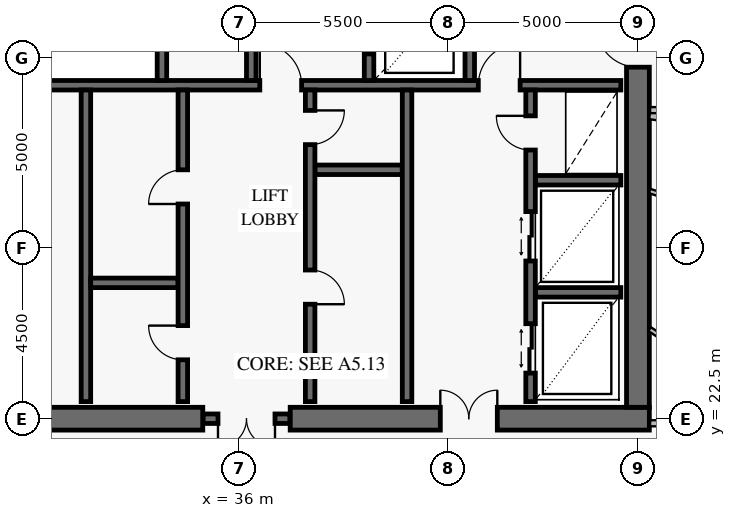
"""IFC4 building model, lengths in metres.
Left out: names, types, materials, properties, quantities, classifications, styles, units other than length and angle.
Written with IfcOpenShell. Run it as: python <this file> out.ifc"""

import sys

from ifc_helpers import new_model, si_unit, direction, frame, frame_2d, origin, place, context, subcontext, project, spatial, rectangle, extrude, element, fill, save


model = new_model("IFC4")
c1 = context("Model", 3, precision=1e-05, world=origin(), true_north=direction((0.0, 1.0)))
c2 = subcontext(c1, "Body", "Model", "MODEL_VIEW")
j1 = project(units=[si_unit("LENGTHUNIT", "METRE"), si_unit("PLANEANGLEUNIT", "RADIAN")], contexts=[c1])
p1 = place(None, origin())
s1 = spatial("IfcSite", under=j1, at=p1, CompositionType="ELEMENT")
p2 = place(p1, origin())
s2 = spatial("IfcBuilding", under=s1, at=p2, CompositionType="ELEMENT")
p3 = place(p2, frame((0.0, 0.0, 231.2)))
s3 = spatial("IfcBuildingStorey", under=s2, at=p3, CompositionType="ELEMENT", Elevation=231.2)
p4 = place(p3, frame((25.2, 22.5, 0.0), z_axis=(0.0, 0.0, 1.0), x_axis=(1.0, 0.0, 0.0)))
e1 = element("IfcWall", 1, at=p4, inside=s3, PredefinedType="SHEAR", context=c2, shape_type="SweptSolid", body=[
    extrude(rectangle(XDim=9.85, YDim=0.6, at=frame_2d((4.925, 0.0))), origin(), (0.0, 0.0, 1.0), 3.8),
])
p5 = place(p4, frame((4.2, 0.0, 0.0)))
e2 = element("IfcOpeningElement", 2, at=p5, cuts=e1, PredefinedType="OPENING", context=c2, shape_type="SweptSolid", body=[
    extrude(rectangle(XDim=1.5, YDim=2.15, at=frame_2d((0.75, 1.075))), frame((0.0, 0.312, 0.0), z_axis=(0.0, -1.0, 0.0), x_axis=(1.0, 0.0, 0.0)), (0.0, 0.0, 1.0), 0.624),
])
p6 = place(p3, frame((37.35, 22.5, 0.0), z_axis=(0.0, 0.0, 1.0), x_axis=(1.0, 0.0, 0.0)))
e3 = element("IfcWall", 3, at=p6, inside=s3, PredefinedType="SHEAR", context=c2, shape_type="SweptSolid", body=[
    extrude(rectangle(XDim=9.45, YDim=0.6, at=frame_2d((4.725, 0.0))), origin(), (0.0, 0.0, 1.0), 3.8),
])
p7 = place(p6, frame((3.95, 0.0, 0.0)))
e4 = element("IfcOpeningElement", 4, at=p7, cuts=e3, PredefinedType="OPENING", context=c2, shape_type="SweptSolid", body=[
    extrude(rectangle(XDim=1.5, YDim=2.15, at=frame_2d((0.75, 1.075))), frame((0.0, 0.312, 0.0), z_axis=(0.0, -1.0, 0.0), x_axis=(1.0, 0.0, 0.0)), (0.0, 0.0, 1.0), 0.624),
])
p8 = place(p3, frame((46.5, 22.8, 0.0), z_axis=(0.0, 0.0, 1.0), x_axis=(0.0, 1.0, 0.0)))
e5 = element("IfcWall", 5, at=p8, inside=s3, PredefinedType="SHEAR", context=c2, shape_type="SweptSolid", body=[
    extrude(rectangle(XDim=18.4, YDim=0.6, at=frame_2d((9.2, 0.0))), origin(), (0.0, 0.0, 1.0), 3.8),
])
p9 = place(p8, frame((8.95, 0.0, 0.0)))
e6 = element("IfcOpeningElement", 6, at=p9, cuts=e5, PredefinedType="OPENING", context=c2, shape_type="SweptSolid", body=[
    extrude(rectangle(XDim=1.1, YDim=2.15, at=frame_2d((0.55, 1.075))), frame((0.0, 0.312, 0.0), z_axis=(0.0, -1.0, 0.0), x_axis=(1.0, 0.0, 0.0)), (0.0, 0.0, 1.0), 0.624),
])
p10 = place(p3, frame((35.06, 22.5, 0.0), z_axis=(0.0, 0.0, 1.0), x_axis=(1.0, 0.0, 0.0)))
e7 = element("IfcWall", 7, at=p10, inside=s3, PredefinedType="SOLIDWALL", context=c2, shape_type="SweptSolid", body=[
    extrude(rectangle(XDim=2.28, YDim=0.25, at=frame_2d((1.14, 0.0))), origin(), (0.0, 0.0, 1.0), 3.8),
])
p11 = place(p10, frame((0.39, 0.0, 0.0)))
e8 = element("IfcOpeningElement", 8, at=p11, cuts=e7, PredefinedType="OPENING", context=c2, shape_type="SweptSolid", body=[
    extrude(rectangle(XDim=1.5, YDim=2.15, at=frame_2d((0.75, 1.075))), frame((0.0, 0.137, 0.0), z_axis=(0.0, -1.0, 0.0), x_axis=(1.0, 0.0, 0.0)), (0.0, 0.0, 1.0), 0.274),
])
p12 = place(p3, frame((25.95, 31.275, 0.0), z_axis=(0.0, 0.0, 1.0), x_axis=(1.0, 0.0, 0.0)))
e9 = element("IfcWall", 9, at=p12, inside=s3, PredefinedType="SOLIDWALL", context=c2, shape_type="SweptSolid", body=[
    extrude(rectangle(XDim=20.1, YDim=0.25, at=frame_2d((10.05, 0.0))), origin(), (0.0, 0.0, 1.0), 3.8),
])
p13 = place(p12, frame((2.6, 0.0, 0.0)))
e10 = element("IfcOpeningElement", 10, at=p13, cuts=e9, PredefinedType="OPENING", context=c2, shape_type="SweptSolid", body=[
    extrude(rectangle(XDim=1.1, YDim=2.15, at=frame_2d((0.55, 1.075))), frame((0.0, 0.137, 0.0), z_axis=(0.0, -1.0, 0.0), x_axis=(1.0, 0.0, 0.0)), (0.0, 0.0, 1.0), 0.274),
])
p14 = place(p12, frame((10.6, 0.0, 0.0)))
e11 = element("IfcOpeningElement", 11, at=p14, cuts=e9, PredefinedType="OPENING", context=c2, shape_type="SweptSolid", body=[
    extrude(rectangle(XDim=1.1, YDim=2.15, at=frame_2d((0.55, 1.075))), frame((0.0, 0.137, 0.0), z_axis=(0.0, -1.0, 0.0), x_axis=(1.0, 0.0, 0.0)), (0.0, 0.0, 1.0), 0.274),
])
p15 = place(p12, frame((16.35, 0.0, 0.0)))
e12 = element("IfcOpeningElement", 12, at=p15, cuts=e9, PredefinedType="OPENING", context=c2, shape_type="SweptSolid", body=[
    extrude(rectangle(XDim=1.1, YDim=2.15, at=frame_2d((0.55, 1.075))), frame((0.0, 0.137, 0.0), z_axis=(0.0, -1.0, 0.0), x_axis=(1.0, 0.0, 0.0)), (0.0, 0.0, 1.0), 0.274),
])
for number, where, z_axis, x_axis in (
    (13, (33.975, 31.4, 0.0), (0.0, 0.0, 1.0), (0.0, 1.0, 0.0)),
    (14, (42.075, 31.4, 0.0), (0.0, 0.0, 1.0), (0.0, 1.0, 0.0)),
):
    element("IfcWall", number, at=place(p3, frame(where, z_axis=z_axis, x_axis=x_axis)), inside=s3, PredefinedType="SOLIDWALL", context=c2, shape_type="SweptSolid", body=[
        extrude(rectangle(XDim=9.7, YDim=0.25, at=frame_2d((4.85, 0.0))), origin(), (0.0, 0.0, 1.0), 3.8),
    ])
p16 = place(p3, frame((36.325, 31.4, 0.0), z_axis=(0.0, 0.0, 1.0), x_axis=(0.0, 1.0, 0.0)))
e15 = element("IfcWall", 15, at=p16, inside=s3, PredefinedType="SOLIDWALL", context=c2, shape_type="SweptSolid", body=[
    extrude(rectangle(XDim=9.65, YDim=0.25, at=frame_2d((4.825, 0.0))), origin(), (0.0, 0.0, 1.0), 3.8),
])
p17 = place(p16, frame((2.965, 0.0, 0.0)))
e16 = element("IfcOpeningElement", 16, at=p17, cuts=e15, PredefinedType="OPENING", context=c2, shape_type="SweptSolid", body=[
    extrude(rectangle(XDim=0.9, YDim=2.1, at=frame_2d((0.45, 1.05))), frame((0.0, 0.137, 0.0), z_axis=(0.0, -1.0, 0.0), x_axis=(1.0, 0.0, 0.0)), (0.0, 0.0, 1.0), 0.274),
])
p18 = place(p16, frame((7.885, 0.0, 0.0)))
e17 = element("IfcOpeningElement", 17, at=p18, cuts=e15, PredefinedType="OPENING", context=c2, shape_type="SweptSolid", body=[
    extrude(rectangle(XDim=0.9, YDim=2.1, at=frame_2d((0.45, 1.05))), frame((0.0, 0.137, 0.0), z_axis=(0.0, -1.0, 0.0), x_axis=(1.0, 0.0, 0.0)), (0.0, 0.0, 1.0), 0.274),
])
p19 = place(p3, frame((39.425, 31.4, 0.0), z_axis=(0.0, 0.0, 1.0), x_axis=(0.0, 1.0, 0.0)))
e18 = element("IfcWall", 18, at=p19, inside=s3, PredefinedType="SOLIDWALL", context=c2, shape_type="SweptSolid", body=[
    extrude(rectangle(XDim=9.65, YDim=0.25, at=frame_2d((4.825, 0.0))), origin(), (0.0, 0.0, 1.0), 3.8),
])
p20 = place(p19, frame((0.7, 0.0, 0.0)))
e19 = element("IfcOpeningElement", 19, at=p20, cuts=e18, PredefinedType="OPENING", context=c2, shape_type="SweptSolid", body=[
    extrude(rectangle(XDim=1.1, YDim=2.2, at=frame_2d((0.55, 1.1))), frame((0.0, 0.137, 0.0), z_axis=(0.0, -1.0, 0.0), x_axis=(1.0, 0.0, 0.0)), (0.0, 0.0, 1.0), 0.274),
])
p21 = place(p19, frame((3.45, 0.0, 0.0)))
e20 = element("IfcOpeningElement", 20, at=p21, cuts=e18, PredefinedType="OPENING", context=c2, shape_type="SweptSolid", body=[
    extrude(rectangle(XDim=1.1, YDim=2.2, at=frame_2d((0.55, 1.1))), frame((0.0, 0.137, 0.0), z_axis=(0.0, -1.0, 0.0), x_axis=(1.0, 0.0, 0.0)), (0.0, 0.0, 1.0), 0.274),
])
p22 = place(p19, frame((6.2, 0.0, 0.0)))
e21 = element("IfcOpeningElement", 21, at=p22, cuts=e18, PredefinedType="OPENING", context=c2, shape_type="SweptSolid", body=[
    extrude(rectangle(XDim=1.1, YDim=2.2, at=frame_2d((0.55, 1.1))), frame((0.0, 0.137, 0.0), z_axis=(0.0, -1.0, 0.0), x_axis=(1.0, 0.0, 0.0)), (0.0, 0.0, 1.0), 0.274),
])
p23 = place(p19, frame((8.47, 0.0, 0.0)))
e22 = element("IfcOpeningElement", 22, at=p23, cuts=e18, PredefinedType="OPENING", context=c2, shape_type="SweptSolid", body=[
    extrude(rectangle(XDim=0.9, YDim=2.1, at=frame_2d((0.45, 1.05))), frame((0.0, 0.137, 0.0), z_axis=(0.0, -1.0, 0.0), x_axis=(1.0, 0.0, 0.0)), (0.0, 0.0, 1.0), 0.274),
])
p24 = place(p3, frame((31.975, 22.95, 0.0), z_axis=(0.0, 0.0, 1.0), x_axis=(0.0, 1.0, 0.0)))
e23 = element("IfcWall", 23, at=p24, inside=s3, PredefinedType="SOLIDWALL", context=c2, shape_type="SweptSolid", body=[
    extrude(rectangle(XDim=8.2, YDim=0.25, at=frame_2d((4.1, 0.0))), origin(), (0.0, 0.0, 1.0), 3.8),
])
p25 = place(p3, frame((32.1, 26.075, 0.0), z_axis=(0.0, 0.0, 1.0), x_axis=(1.0, 0.0, 0.0)))
e24 = element("IfcWall", 24, at=p25, inside=s3, PredefinedType="SOLIDWALL", context=c2, shape_type="SweptSolid", body=[
    extrude(rectangle(XDim=2.3, YDim=0.25, at=frame_2d((1.15, 0.0))), origin(), (0.0, 0.0, 1.0), 3.8),
])
p26 = place(p3, frame((34.525, 22.95, 0.0), z_axis=(0.0, 0.0, 1.0), x_axis=(0.0, 1.0, 0.0)))
e25 = element("IfcWall", 25, at=p26, inside=s3, PredefinedType="SOLIDWALL", context=c2, shape_type="SweptSolid", body=[
    extrude(rectangle(XDim=8.2, YDim=0.25, at=frame_2d((4.1, 0.0))), origin(), (0.0, 0.0, 1.0), 3.8),
])
p27 = place(p26, frame((1.1, 0.0, 0.0)))
e26 = element("IfcOpeningElement", 26, at=p27, cuts=e25, PredefinedType="OPENING", context=c2, shape_type="SweptSolid", body=[
    extrude(rectangle(XDim=0.9, YDim=2.1, at=frame_2d((0.45, 1.05))), frame((0.0, 0.137, 0.0), z_axis=(0.0, -1.0, 0.0), x_axis=(1.0, 0.0, 0.0)), (0.0, 0.0, 1.0), 0.274),
])
p28 = place(p26, frame((5.2, 0.0, 0.0)))
e27 = element("IfcOpeningElement", 27, at=p28, cuts=e25, PredefinedType="OPENING", context=c2, shape_type="SweptSolid", body=[
    extrude(rectangle(XDim=0.9, YDim=2.1, at=frame_2d((0.45, 1.05))), frame((0.0, 0.137, 0.0), z_axis=(0.0, -1.0, 0.0), x_axis=(1.0, 0.0, 0.0)), (0.0, 0.0, 1.0), 0.274),
])
p29 = place(p3, frame((38.0, 29.05, 0.0), z_axis=(0.0, 0.0, 1.0), x_axis=(1.0, 0.0, 0.0)))
e28 = element("IfcWall", 28, at=p29, inside=s3, PredefinedType="SOLIDWALL", context=c2, shape_type="SweptSolid", body=[
    extrude(rectangle(XDim=2.3, YDim=0.25, at=frame_2d((1.15, 0.0))), origin(), (0.0, 0.0, 1.0), 3.8),
])
p30 = place(p3, frame((37.875, 22.95, 0.0), z_axis=(0.0, 0.0, 1.0), x_axis=(0.0, 1.0, 0.0)))
e29 = element("IfcWall", 29, at=p30, inside=s3, PredefinedType="SOLIDWALL", context=c2, shape_type="SweptSolid", body=[
    extrude(rectangle(XDim=8.2, YDim=0.25, at=frame_2d((4.1, 0.0))), origin(), (0.0, 0.0, 1.0), 3.8),
])
p31 = place(p30, frame((2.562, 0.0, 0.0)))
e30 = element("IfcOpeningElement", 30, at=p31, cuts=e29, PredefinedType="OPENING", context=c2, shape_type="SweptSolid", body=[
    extrude(rectangle(XDim=0.9, YDim=2.1, at=frame_2d((0.45, 1.05))), frame((0.0, 0.137, 0.0), z_axis=(0.0, -1.0, 0.0), x_axis=(1.0, 0.0, 0.0)), (0.0, 0.0, 1.0), 0.274),
])
p32 = place(p30, frame((6.762, 0.0, 0.0)))
e31 = element("IfcOpeningElement", 31, at=p32, cuts=e29, PredefinedType="OPENING", context=c2, shape_type="SweptSolid", body=[
    extrude(rectangle(XDim=0.9, YDim=2.1, at=frame_2d((0.45, 1.05))), frame((0.0, 0.137, 0.0), z_axis=(0.0, -1.0, 0.0), x_axis=(1.0, 0.0, 0.0)), (0.0, 0.0, 1.0), 0.274),
])
p33 = place(p3, frame((40.425, 22.95, 0.0), z_axis=(0.0, 0.0, 1.0), x_axis=(0.0, 1.0, 0.0)))
e32 = element("IfcWall", 32, at=p33, inside=s3, PredefinedType="SOLIDWALL", context=c2, shape_type="SweptSolid", body=[
    extrude(rectangle(XDim=8.2, YDim=0.25, at=frame_2d((4.1, 0.0))), origin(), (0.0, 0.0, 1.0), 3.8),
])
for number, where, z_axis, x_axis in (
    (33, (43.8, 25.825, 0.0), (0.0, 0.0, 1.0), (1.0, 0.0, 0.0)),
    (34, (43.8, 28.775, 0.0), (0.0, 0.0, 1.0), (1.0, 0.0, 0.0)),
):
    element("IfcWall", number, at=place(p3, frame(where, z_axis=z_axis, x_axis=x_axis)), inside=s3, PredefinedType="SOLIDWALL", context=c2, shape_type="SweptSolid", body=[
        extrude(rectangle(XDim=2.25, YDim=0.25, at=frame_2d((1.125, 0.0))), origin(), (0.0, 0.0, 1.0), 3.8),
    ])
p34 = place(p3, frame((43.675, 22.95, 0.0), z_axis=(0.0, 0.0, 1.0), x_axis=(0.0, 1.0, 0.0)))
e35 = element("IfcWall", 35, at=p34, inside=s3, PredefinedType="SOLIDWALL", context=c2, shape_type="SweptSolid", body=[
    extrude(rectangle(XDim=8.2, YDim=0.25, at=frame_2d((4.1, 0.0))), origin(), (0.0, 0.0, 1.0), 3.8),
])
p35 = place(p34, frame((0.75, 0.0, 0.0)))
e36 = element("IfcOpeningElement", 36, at=p35, cuts=e35, PredefinedType="OPENING", context=c2, shape_type="SweptSolid", body=[
    extrude(rectangle(XDim=1.3, YDim=2.3, at=frame_2d((0.65, 1.15))), frame((0.0, 0.137, 0.0), z_axis=(0.0, -1.0, 0.0), x_axis=(1.0, 0.0, 0.0)), (0.0, 0.0, 1.0), 0.274),
])
p36 = place(p34, frame((3.7, 0.0, 0.0)))
e37 = element("IfcOpeningElement", 37, at=p36, cuts=e35, PredefinedType="OPENING", context=c2, shape_type="SweptSolid", body=[
    extrude(rectangle(XDim=1.3, YDim=2.3, at=frame_2d((0.65, 1.15))), frame((0.0, 0.137, 0.0), z_axis=(0.0, -1.0, 0.0), x_axis=(1.0, 0.0, 0.0)), (0.0, 0.0, 1.0), 0.274),
])
p37 = place(p34, frame((6.62, 0.0, 0.0)))
e38 = element("IfcOpeningElement", 38, at=p37, cuts=e35, PredefinedType="OPENING", context=c2, shape_type="SweptSolid", body=[
    extrude(rectangle(XDim=0.9, YDim=2.1, at=frame_2d((0.45, 1.05))), frame((0.0, 0.137, 0.0), z_axis=(0.0, -1.0, 0.0), x_axis=(1.0, 0.0, 0.0)), (0.0, 0.0, 1.0), 0.274),
])
p38 = place(p3, frame((46.808, 28.491, 0.0), z_axis=(0.0, 0.0, 1.0), x_axis=(0.951120145706, -0.308821094538, 0.0)))
e39 = element("IfcWall", 39, at=p38, inside=s3, PredefinedType="PARTITIONING", context=c2, shape_type="SweptSolid", body=[
    extrude(rectangle(XDim=3.0, YDim=0.12, at=frame_2d((1.5, 0.0))), origin(), (0.0, 0.0, 1.0), 3.55),
])
p39 = place(p3, frame((46.808, 24.857, 0.0), z_axis=(0.0, 0.0, 1.0), x_axis=(0.834229042932, -0.551418084514, 0.0)))
e40 = element("IfcWall", 40, at=p39, inside=s3, PredefinedType="PARTITIONING", context=c2, shape_type="SweptSolid", body=[
    extrude(rectangle(XDim=1.736, YDim=0.12, at=frame_2d((0.868, 0.0))), origin(), (0.0, 0.0, 1.0), 3.55),
])
p40 = place(p3, frame((46.808, 30.481, 0.0), z_axis=(0.0, 0.0, 1.0), x_axis=(0.990266776737, -0.139182293739, 0.0)))
e41 = element("IfcWall", 41, at=p40, inside=s3, PredefinedType="PARTITIONING", context=c2, shape_type="SweptSolid", body=[
    extrude(rectangle(XDim=16.657, YDim=0.2, at=frame_2d((8.329, 0.0))), origin(), (0.0, 0.0, 1.0), 2.93),
])
p41 = place(p3, frame((48.849, 22.38, 0.0), z_axis=(0.0, 0.0, 1.0), x_axis=(-1.0, 0.0, 0.0)))
e42 = element("IfcWall", 42, at=p41, inside=s3, PredefinedType="PARTITIONING", context=c2, shape_type="SweptSolid", body=[
    extrude(rectangle(XDim=2.029, YDim=0.16, at=frame_2d((1.015, 0.0))), origin(), (0.0, 0.0, 1.0), 3.55),
])
p42 = place(p3, frame((46.82, 30.62, 0.0), z_axis=(0.0, 0.0, 1.0), x_axis=(1.0, 0.0, 0.0)))
e43 = element("IfcWall", 43, at=p42, inside=s3, PredefinedType="PARTITIONING", context=c2, shape_type="SweptSolid", body=[
    extrude(rectangle(XDim=2.03, YDim=0.16, at=frame_2d((1.015, 0.0))), origin(), (0.0, 0.0, 1.0), 3.55),
])
p43 = place(p9, origin())
e44 = element("IfcDoor", 44, at=p43, inside=s3, OperationType="SINGLE_SWING_RIGHT", PredefinedType="USERDEFINED", context=c2, shape_type="SweptSolid", body=[
    extrude(rectangle(XDim=1.1, YDim=2.15, at=frame_2d((0.55, 1.075))), frame((0.0, 0.025, 0.0), z_axis=(0.0, -1.0, 0.0), x_axis=(1.0, 0.0, 0.0)), (0.0, 0.0, 1.0), 0.05),
])
fill(e6, e44)
p44 = place(p7, origin())
e45 = element("IfcDoor", 45, at=p44, inside=s3, OperationType="DOUBLE_DOOR_SINGLE_SWING", PredefinedType="DOOR", context=c2, shape_type="SweptSolid", body=[
    extrude(rectangle(XDim=1.5, YDim=2.15, at=frame_2d((0.75, 1.075))), frame((0.0, 0.025, 0.0), z_axis=(0.0, -1.0, 0.0), x_axis=(1.0, 0.0, 0.0)), (0.0, 0.0, 1.0), 0.05),
])
fill(e4, e45)
p45 = place(p11, frame((1.5, 0.0, 0.0), z_axis=(0.0, 0.0, 1.0), x_axis=(-1.0, 0.0, 0.0)))
e46 = element("IfcDoor", 46, at=p45, inside=s3, OperationType="DOUBLE_DOOR_SINGLE_SWING", PredefinedType="DOOR", context=c2, shape_type="SweptSolid", body=[
    extrude(rectangle(XDim=1.5, YDim=2.15, at=frame_2d((0.75, 1.075))), frame((0.0, 0.025, 0.0), z_axis=(0.0, -1.0, 0.0), x_axis=(1.0, 0.0, 0.0)), (0.0, 0.0, 1.0), 0.05),
])
fill(e8, e46)
p46 = place(p14, origin())
e47 = element("IfcDoor", 47, at=p46, inside=s3, OperationType="SINGLE_SWING_LEFT", PredefinedType="USERDEFINED", context=c2, shape_type="SweptSolid", body=[
    extrude(rectangle(XDim=1.1, YDim=2.15, at=frame_2d((0.55, 1.075))), frame((0.0, 0.025, 0.0), z_axis=(0.0, -1.0, 0.0), x_axis=(1.0, 0.0, 0.0)), (0.0, 0.0, 1.0), 0.05),
])
fill(e11, e47)
p47 = place(p15, origin())
e48 = element("IfcDoor", 48, at=p47, inside=s3, OperationType="SINGLE_SWING_RIGHT", PredefinedType="USERDEFINED", context=c2, shape_type="SweptSolid", body=[
    extrude(rectangle(XDim=1.1, YDim=2.15, at=frame_2d((0.55, 1.075))), frame((0.0, 0.025, 0.0), z_axis=(0.0, -1.0, 0.0), x_axis=(1.0, 0.0, 0.0)), (0.0, 0.0, 1.0), 0.05),
])
fill(e12, e48)
p48 = place(p20, origin())
e49 = element("IfcDoor", 49, at=p48, inside=s3, OperationType="DOUBLE_DOOR_SLIDING", PredefinedType="DOOR", context=c2, shape_type="SweptSolid", body=[
    extrude(rectangle(XDim=1.1, YDim=2.2, at=frame_2d((0.55, 1.1))), frame((0.0, 0.025, 0.0), z_axis=(0.0, -1.0, 0.0), x_axis=(1.0, 0.0, 0.0)), (0.0, 0.0, 1.0), 0.05),
])
fill(e19, e49)
p49 = place(p27, origin())
e50 = element("IfcDoor", 50, at=p49, inside=s3, OperationType="SINGLE_SWING_RIGHT", PredefinedType="DOOR", context=c2, shape_type="SweptSolid", body=[
    extrude(rectangle(XDim=0.9, YDim=2.1, at=frame_2d((0.45, 1.05))), frame((0.0, 0.025, 0.0), z_axis=(0.0, -1.0, 0.0), x_axis=(1.0, 0.0, 0.0)), (0.0, 0.0, 1.0), 0.05),
])
fill(e26, e50)
p50 = place(p28, origin())
e51 = element("IfcDoor", 51, at=p50, inside=s3, OperationType="SINGLE_SWING_LEFT", PredefinedType="DOOR", context=c2, shape_type="SweptSolid", body=[
    extrude(rectangle(XDim=0.9, YDim=2.1, at=frame_2d((0.45, 1.05))), frame((0.0, 0.025, 0.0), z_axis=(0.0, -1.0, 0.0), x_axis=(1.0, 0.0, 0.0)), (0.0, 0.0, 1.0), 0.05),
])
fill(e27, e51)
p51 = place(p31, frame((0.9, 0.0, 0.0), z_axis=(0.0, 0.0, 1.0), x_axis=(-1.0, 0.0, 0.0)))
e52 = element("IfcDoor", 52, at=p51, inside=s3, OperationType="SINGLE_SWING_RIGHT", PredefinedType="DOOR", context=c2, shape_type="SweptSolid", body=[
    extrude(rectangle(XDim=0.9, YDim=2.1, at=frame_2d((0.45, 1.05))), frame((0.0, 0.025, 0.0), z_axis=(0.0, -1.0, 0.0), x_axis=(1.0, 0.0, 0.0)), (0.0, 0.0, 1.0), 0.05),
])
fill(e30, e52)
p52 = place(p32, frame((0.9, 0.0, 0.0), z_axis=(0.0, 0.0, 1.0), x_axis=(-1.0, 0.0, 0.0)))
e53 = element("IfcDoor", 53, at=p52, inside=s3, OperationType="SINGLE_SWING_LEFT", PredefinedType="DOOR", context=c2, shape_type="SweptSolid", body=[
    extrude(rectangle(XDim=0.9, YDim=2.1, at=frame_2d((0.45, 1.05))), frame((0.0, 0.025, 0.0), z_axis=(0.0, -1.0, 0.0), x_axis=(1.0, 0.0, 0.0)), (0.0, 0.0, 1.0), 0.05),
])
fill(e31, e53)
p53 = place(p35, origin())
e54 = element("IfcDoor", 54, at=p53, inside=s3, OperationType="DOUBLE_DOOR_SLIDING", PredefinedType="DOOR", context=c2, shape_type="SweptSolid", body=[
    extrude(rectangle(XDim=1.3, YDim=2.3, at=frame_2d((0.65, 1.15))), frame((0.0, 0.025, 0.0), z_axis=(0.0, -1.0, 0.0), x_axis=(1.0, 0.0, 0.0)), (0.0, 0.0, 1.0), 0.05),
])
fill(e36, e54)
p54 = place(p36, origin())
e55 = element("IfcDoor", 55, at=p54, inside=s3, OperationType="DOUBLE_DOOR_SLIDING", PredefinedType="DOOR", context=c2, shape_type="SweptSolid", body=[
    extrude(rectangle(XDim=1.3, YDim=2.3, at=frame_2d((0.65, 1.15))), frame((0.0, 0.025, 0.0), z_axis=(0.0, -1.0, 0.0), x_axis=(1.0, 0.0, 0.0)), (0.0, 0.0, 1.0), 0.05),
])
fill(e37, e55)
p55 = place(p37, origin())
e56 = element("IfcDoor", 56, at=p55, inside=s3, OperationType="SINGLE_SWING_RIGHT", PredefinedType="DOOR", context=c2, shape_type="SweptSolid", body=[
    extrude(rectangle(XDim=0.9, YDim=2.1, at=frame_2d((0.45, 1.05))), frame((0.0, 0.025, 0.0), z_axis=(0.0, -1.0, 0.0), x_axis=(1.0, 0.0, 0.0)), (0.0, 0.0, 1.0), 0.05),
])
fill(e38, e56)
save(model, sys.argv[1])
